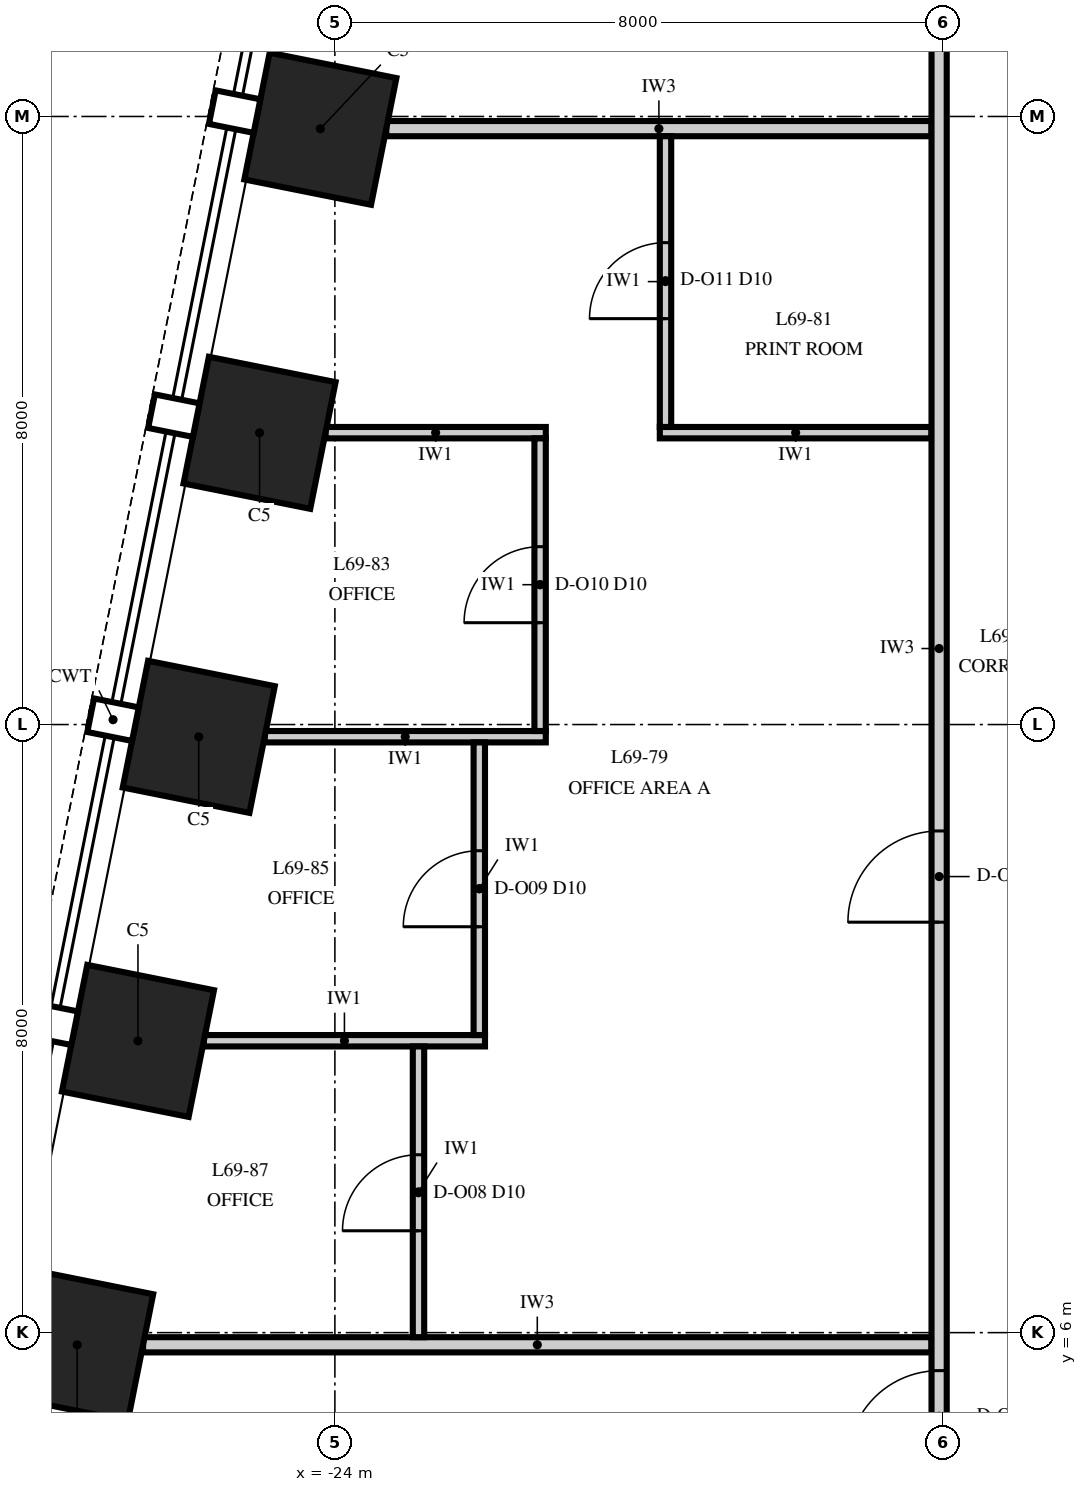
"""IFC4 building model, lengths in metres.
Left out: names, types, materials, properties, quantities, classifications, styles, units other than length and angle.
Written with IfcOpenShell. Run it as: python <this file> out.ifc"""

import sys

from ifc_helpers import new_model, si_unit, direction, frame, frame_2d, origin, origin_2d, place, context, subcontext, project, spatial, rectangle, extrude, element, fill, save


model = new_model("IFC4")
c1 = context("Model", 3, precision=1e-05, world=origin(), true_north=direction((0.0, 1.0)))
c2 = subcontext(c1, "Body", "Model", "MODEL_VIEW")
j1 = project(units=[si_unit("LENGTHUNIT", "METRE"), si_unit("PLANEANGLEUNIT", "RADIAN")], contexts=[c1])
p1 = place(None, origin())
s1 = spatial("IfcSite", under=j1, at=p1, CompositionType="ELEMENT")
p2 = place(p1, origin())
s2 = spatial("IfcBuilding", under=s1, at=p2, CompositionType="ELEMENT")
p3 = place(p2, frame((0.0, 0.0, 296.0)))
s3 = spatial("IfcBuildingStorey", under=s2, at=p3, CompositionType="ELEMENT", Elevation=296.0)
for number, where, z_axis, x_axis in (
    (1, (-24.191, 21.838, 0.0), (0.0, 0.0, 1.0), (-0.196, -0.981, 0.0)),
    (2, (-24.991, 17.838, 0.0), (0.0, 0.0, 1.0), (-0.196, -0.981, 0.0)),
    (3, (-25.791, 13.838, 0.0), (0.0, 0.0, 1.0), (-0.196, -0.981, 0.0)),
    (4, (-26.591, 9.838, 0.0), (0.0, 0.0, 1.0), (-0.196, -0.981, 0.0)),
    (5, (-27.391, 5.838, 0.0), (0.0, 0.0, 1.0), (-0.196, -0.981, 0.0)),
):
    element("IfcColumn", number, at=place(p3, frame(where, z_axis=z_axis, x_axis=x_axis)), inside=s3, PredefinedType="COLUMN", context=c2, shape_type="SweptSolid", body=[
        extrude(rectangle(XDim=1.7, YDim=1.7, at=origin_2d()), origin(), (0.0, 0.0, 1.0), 4.0),
    ])
p4 = place(p3, frame((-26.524, 5.84, 0.0), z_axis=(0.0, 0.0, 1.0), x_axis=(1.0, 0.0, 0.0)))
e6 = element("IfcWall", 6, at=p4, inside=s3, PredefinedType="PARTITIONING", context=c2, shape_type="SweptSolid", body=[
    extrude(rectangle(XDim=10.374, YDim=0.2, at=frame_2d((5.187, 0.0))), origin(), (0.0, 0.0, 1.0), 2.842),
])
p5 = place(p3, frame((-25.724, 9.84, 0.0), z_axis=(0.0, 0.0, 1.0), x_axis=(1.0, 0.0, 0.0)))
e7 = element("IfcWall", 7, at=p5, inside=s3, PredefinedType="PARTITIONING", context=c2, shape_type="SweptSolid", body=[
    extrude(rectangle(XDim=3.699, YDim=0.15, at=frame_2d((1.85, 0.0))), origin(), (0.0, 0.0, 1.0), 3.23),
])
p6 = place(p3, frame((-24.924, 13.84, 0.0), z_axis=(0.0, 0.0, 1.0), x_axis=(1.0, 0.0, 0.0)))
e8 = element("IfcWall", 8, at=p6, inside=s3, PredefinedType="PARTITIONING", context=c2, shape_type="SweptSolid", body=[
    extrude(rectangle(XDim=3.699, YDim=0.15, at=frame_2d((1.849, 0.0))), origin(), (0.0, 0.0, 1.0), 3.23),
])
p7 = place(p3, frame((-24.124, 17.84, 0.0), z_axis=(0.0, 0.0, 1.0), x_axis=(1.0, 0.0, 0.0)))
e9 = element("IfcWall", 9, at=p7, inside=s3, PredefinedType="PARTITIONING", context=c2, shape_type="SweptSolid", body=[
    extrude(rectangle(XDim=2.899, YDim=0.15, at=frame_2d((1.449, 0.0))), origin(), (0.0, 0.0, 1.0), 3.23),
])
p8 = place(p3, frame((-19.725, 17.84, 0.0), z_axis=(0.0, 0.0, 1.0), x_axis=(1.0, 0.0, 0.0)))
e10 = element("IfcWall", 10, at=p8, inside=s3, PredefinedType="PARTITIONING", context=c2, shape_type="SweptSolid", body=[
    extrude(rectangle(XDim=3.575, YDim=0.15, at=frame_2d((1.788, 0.0))), origin(), (0.0, 0.0, 1.0), 3.23),
])
p9 = place(p3, frame((-23.324, 21.84, 0.0), z_axis=(0.0, 0.0, 1.0), x_axis=(1.0, 0.0, 0.0)))
e11 = element("IfcWall", 11, at=p9, inside=s3, PredefinedType="PARTITIONING", context=c2, shape_type="SweptSolid", body=[
    extrude(rectangle(XDim=7.174, YDim=0.2, at=frame_2d((3.587, 0.0))), origin(), (0.0, 0.0, 1.0), 3.23),
])
p10 = place(p3, frame((-22.9, 5.94, 0.0), z_axis=(0.0, 0.0, 1.0), x_axis=(0.0, 1.0, 0.0)))
e12 = element("IfcWall", 12, at=p10, inside=s3, PredefinedType="PARTITIONING", context=c2, shape_type="SweptSolid", body=[
    extrude(rectangle(XDim=3.825, YDim=0.15, at=frame_2d((1.913, 0.0))), origin(), (0.0, 0.0, 1.0), 2.842),
])
p11 = place(p10, frame((1.4, 0.0, 0.0)))
e13 = element("IfcOpeningElement", 13, at=p11, cuts=e12, PredefinedType="OPENING", context=c2, shape_type="SweptSolid", body=[
    extrude(rectangle(XDim=1.0, YDim=2.3, at=frame_2d((0.5, 1.15))), frame((0.0, 0.09, 0.0), z_axis=(0.0, -1.0, 0.0), x_axis=(1.0, 0.0, 0.0)), (0.0, 0.0, 1.0), 0.18),
])
p12 = place(p3, frame((-22.1, 9.915, 0.0), z_axis=(0.0, 0.0, 1.0), x_axis=(0.0, 1.0, 0.0)))
e14 = element("IfcWall", 14, at=p12, inside=s3, PredefinedType="PARTITIONING", context=c2, shape_type="SweptSolid", body=[
    extrude(rectangle(XDim=3.85, YDim=0.15, at=frame_2d((1.925, 0.0))), origin(), (0.0, 0.0, 1.0), 3.85),
])
p13 = place(p12, frame((1.425, 0.0, 0.0)))
e15 = element("IfcOpeningElement", 15, at=p13, cuts=e14, PredefinedType="OPENING", context=c2, shape_type="SweptSolid", body=[
    extrude(rectangle(XDim=1.0, YDim=2.3, at=frame_2d((0.5, 1.15))), frame((0.0, 0.09, 0.0), z_axis=(0.0, -1.0, 0.0), x_axis=(1.0, 0.0, 0.0)), (0.0, 0.0, 1.0), 0.18),
])
p14 = place(p3, frame((-21.3, 13.915, 0.0), z_axis=(0.0, 0.0, 1.0), x_axis=(0.0, 1.0, 0.0)))
e16 = element("IfcWall", 16, at=p14, inside=s3, PredefinedType="PARTITIONING", context=c2, shape_type="SweptSolid", body=[
    extrude(rectangle(XDim=3.85, YDim=0.15, at=frame_2d((1.925, 0.0))), origin(), (0.0, 0.0, 1.0), 3.23),
])
p15 = place(p14, frame((1.425, 0.0, 0.0)))
e17 = element("IfcOpeningElement", 17, at=p15, cuts=e16, PredefinedType="OPENING", context=c2, shape_type="SweptSolid", body=[
    extrude(rectangle(XDim=1.0, YDim=2.3, at=frame_2d((0.5, 1.15))), frame((0.0, 0.09, 0.0), z_axis=(0.0, -1.0, 0.0), x_axis=(1.0, 0.0, 0.0)), (0.0, 0.0, 1.0), 0.18),
])
p16 = place(p3, frame((-19.65, 17.915, 0.0), z_axis=(0.0, 0.0, 1.0), x_axis=(0.0, 1.0, 0.0)))
e18 = element("IfcWall", 18, at=p16, inside=s3, PredefinedType="PARTITIONING", context=c2, shape_type="SweptSolid", body=[
    extrude(rectangle(XDim=3.825, YDim=0.15, at=frame_2d((1.913, 0.0))), origin(), (0.0, 0.0, 1.0), 3.23),
])
p17 = place(p16, frame((1.425, 0.0, 0.0)))
e19 = element("IfcOpeningElement", 19, at=p17, cuts=e18, PredefinedType="OPENING", context=c2, shape_type="SweptSolid", body=[
    extrude(rectangle(XDim=1.0, YDim=2.3, at=frame_2d((0.5, 1.15))), frame((0.0, 0.09, 0.0), z_axis=(0.0, -1.0, 0.0), x_axis=(1.0, 0.0, 0.0)), (0.0, 0.0, 1.0), 0.18),
])
p18 = place(p3, frame((-16.05, 4.05, 0.0), z_axis=(0.0, 0.0, 1.0), x_axis=(0.0, 1.0, 0.0)))
e20 = element("IfcWall", 20, at=p18, inside=s3, PredefinedType="PARTITIONING", context=c2, shape_type="SweptSolid", body=[
    extrude(rectangle(XDim=21.9, YDim=0.2, at=frame_2d((10.95, 0.0))), origin(), (0.0, 0.0, 1.0), 2.842),
])
p19 = place(p18, frame((0.25, 0.0, 0.0)))
e21 = element("IfcOpeningElement", 21, at=p19, cuts=e20, PredefinedType="OPENING", context=c2, shape_type="SweptSolid", body=[
    extrude(rectangle(XDim=1.2, YDim=2.4, at=frame_2d((0.6, 1.2))), frame((0.0, 0.115, 0.0), z_axis=(0.0, -1.0, 0.0), x_axis=(1.0, 0.0, 0.0)), (0.0, 0.0, 1.0), 0.23),
])
p20 = place(p18, frame((7.35, 0.0, 0.0)))
e22 = element("IfcOpeningElement", 22, at=p20, cuts=e20, PredefinedType="OPENING", context=c2, shape_type="SweptSolid", body=[
    extrude(rectangle(XDim=1.2, YDim=2.4, at=frame_2d((0.6, 1.2))), frame((0.0, 0.115, 0.0), z_axis=(0.0, -1.0, 0.0), x_axis=(1.0, 0.0, 0.0)), (0.0, 0.0, 1.0), 0.23),
])
p21 = place(p18, frame((20.35, 0.0, 0.0)))
e23 = element("IfcOpeningElement", 23, at=p21, cuts=e20, PredefinedType="OPENING", context=c2, shape_type="SweptSolid", body=[
    extrude(rectangle(XDim=1.2, YDim=2.4, at=frame_2d((0.6, 1.2))), frame((0.0, 0.115, 0.0), z_axis=(0.0, -1.0, 0.0), x_axis=(1.0, 0.0, 0.0)), (0.0, 0.0, 1.0), 0.23),
])
p22 = place(p11, origin())
e24 = element("IfcDoor", 24, at=p22, inside=s3, OperationType="SINGLE_SWING_LEFT", PredefinedType="DOOR", context=c2, shape_type="SweptSolid", body=[
    extrude(rectangle(XDim=1.0, YDim=2.3, at=frame_2d((0.5, 1.15))), frame((0.0, 0.075, 0.0), z_axis=(0.0, -1.0, 0.0), x_axis=(1.0, 0.0, 0.0)), (0.0, 0.0, 1.0), 0.149),
])
fill(e13, e24)
p23 = place(p13, origin())
e25 = element("IfcDoor", 25, at=p23, inside=s3, OperationType="SINGLE_SWING_LEFT", PredefinedType="DOOR", context=c2, shape_type="SweptSolid", body=[
    extrude(rectangle(XDim=1.0, YDim=2.3, at=frame_2d((0.5, 1.15))), frame((0.0, 0.075, 0.0), z_axis=(0.0, -1.0, 0.0), x_axis=(1.0, 0.0, 0.0)), (0.0, 0.0, 1.0), 0.149),
])
fill(e15, e25)
p24 = place(p15, origin())
e26 = element("IfcDoor", 26, at=p24, inside=s3, OperationType="SINGLE_SWING_LEFT", PredefinedType="DOOR", context=c2, shape_type="SweptSolid", body=[
    extrude(rectangle(XDim=1.0, YDim=2.3, at=frame_2d((0.5, 1.15))), frame((0.0, 0.075, 0.0), z_axis=(0.0, -1.0, 0.0), x_axis=(1.0, 0.0, 0.0)), (0.0, 0.0, 1.0), 0.149),
])
fill(e17, e26)
p25 = place(p17, origin())
e27 = element("IfcDoor", 27, at=p25, inside=s3, OperationType="SINGLE_SWING_LEFT", PredefinedType="DOOR", context=c2, shape_type="SweptSolid", body=[
    extrude(rectangle(XDim=1.0, YDim=2.3, at=frame_2d((0.5, 1.15))), frame((0.0, 0.075, 0.0), z_axis=(0.0, -1.0, 0.0), x_axis=(1.0, 0.0, 0.0)), (0.0, 0.0, 1.0), 0.149),
])
fill(e19, e27)
p26 = place(p19, origin())
e28 = element("IfcDoor", 28, at=p26, inside=s3, OperationType="SINGLE_SWING_LEFT", PredefinedType="DOOR", context=c2, shape_type="SweptSolid", body=[
    extrude(rectangle(XDim=1.2, YDim=2.4, at=frame_2d((0.6, 1.2))), frame((0.0, 0.1, 0.0), z_axis=(0.0, -1.0, 0.0), x_axis=(1.0, 0.0, 0.0)), (0.0, 0.0, 1.0), 0.199),
])
fill(e21, e28)
p27 = place(p20, origin())
e29 = element("IfcDoor", 29, at=p27, inside=s3, OperationType="SINGLE_SWING_LEFT", PredefinedType="DOOR", context=c2, shape_type="SweptSolid", body=[
    extrude(rectangle(XDim=1.2, YDim=2.4, at=frame_2d((0.6, 1.2))), frame((0.0, 0.1, 0.0), z_axis=(0.0, -1.0, 0.0), x_axis=(1.0, 0.0, 0.0)), (0.0, 0.0, 1.0), 0.199),
])
fill(e22, e29)
save(model, sys.argv[1])
